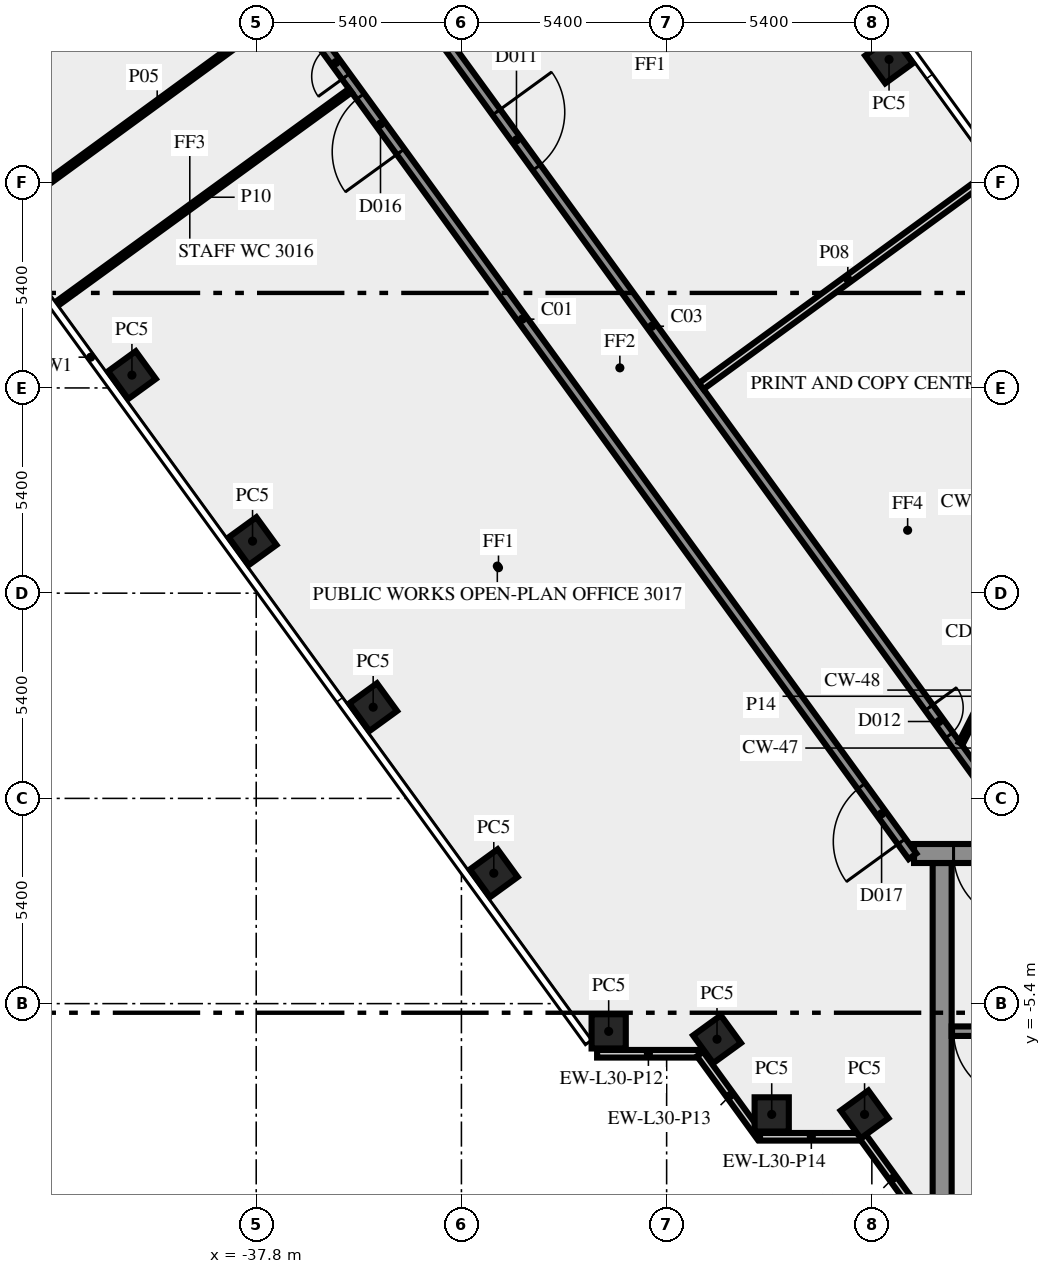
"""IFC4 building model, lengths in metres.
Left out: names, types, materials, properties, quantities, classifications, styles, units other than length and angle.
Written with IfcOpenShell. Run it as: python <this file> out.ifc"""

import sys

from ifc_helpers import new_model, si_unit, direction, frame, frame_2d, origin, origin_2d, place, context, subcontext, project, spatial, rectangle, extrude, element, fill, save


model = new_model("IFC4")
c1 = context("Model", 3, precision=1e-05, world=origin(), true_north=direction((0.0, 1.0)))
c2 = subcontext(c1, "Body", "Model", "MODEL_VIEW")
j1 = project(units=[si_unit("LENGTHUNIT", "METRE"), si_unit("PLANEANGLEUNIT", "RADIAN")], contexts=[c1])
p1 = place(None, origin())
s1 = spatial("IfcSite", under=j1, at=p1, CompositionType="ELEMENT")
p2 = place(p1, origin())
s2 = spatial("IfcBuilding", under=s1, at=p2, CompositionType="ELEMENT")
p3 = place(p2, frame((0.0, 0.0, 129.0)))
s3 = spatial("IfcBuildingStorey", under=s2, at=p3, CompositionType="ELEMENT", Elevation=129.0)
for number, where, z_axis, x_axis in (
    (1, (-21.147, 19.444, 0.0), (0.0, 0.0, 1.0), (-0.588, 0.809, 0.0)),
    (2, (-41.07, 11.137, 0.0), (0.0, 0.0, 1.0), (0.588, -0.809, 0.0)),
    (3, (-37.896, 6.769, 0.0), (0.0, 0.0, 1.0), (0.588, -0.809, 0.0)),
    (4, (-34.722, 2.4, 0.0), (0.0, 0.0, 1.0), (0.588, -0.809, 0.0)),
    (5, (-31.548, -1.969, 0.0), (0.0, 0.0, 1.0), (0.588, -0.809, 0.0)),
    (6, (-28.525, -6.13, 0.0), (0.0, 0.0, 1.0), (1.0, 0.0, 0.0)),
    (7, (-25.674, -6.337, 0.0), (0.0, 0.0, 1.0), (0.588, -0.809, 0.0)),
    (8, (-24.235, -8.315, 0.0), (0.0, 0.0, 1.0), (1.0, 0.0, 0.0)),
    (9, (-21.792, -8.315, 0.0), (0.0, 0.0, 1.0), (0.588, -0.809, 0.0)),
):
    element("IfcColumn", number, at=place(p3, frame(where, z_axis=z_axis, x_axis=x_axis)), inside=s3, PredefinedType="COLUMN", context=c2, shape_type="SweptSolid", body=[
        extrude(rectangle(XDim=0.9, YDim=0.9, at=origin_2d()), origin(), (0.0, 0.0, 1.0), 3.4),
    ])
p4 = place(p3, frame((-28.83, -6.719, 0.0), z_axis=(0.0, 0.0, 1.0), x_axis=(1.0, 0.0, 0.0)))
e10 = element("IfcWall", 10, at=p4, inside=s3, PredefinedType="SOLIDWALL", context=c2, shape_type="SweptSolid", body=[
    extrude(rectangle(XDim=2.7, YDim=0.2, at=frame_2d((1.35, 0.0))), origin(), (0.0, 0.0, 1.0), 3.4),
])
p5 = place(p3, frame((-26.12, -6.724, 0.0), z_axis=(0.0, 0.0, 1.0), x_axis=(0.587720002413, -0.809064397168, 0.0)))
e11 = element("IfcWall", 11, at=p5, inside=s3, PredefinedType="SOLIDWALL", context=c2, shape_type="SweptSolid", body=[
    extrude(rectangle(XDim=2.7, YDim=0.2, at=frame_2d((1.35, 0.0))), origin(), (0.0, 0.0, 1.0), 3.4),
])
p6 = place(p3, frame((-24.543, -8.904, 0.0), z_axis=(0.0, 0.0, 1.0), x_axis=(1.0, 0.0, 0.0)))
e12 = element("IfcWall", 12, at=p6, inside=s3, PredefinedType="SOLIDWALL", context=c2, shape_type="SweptSolid", body=[
    extrude(rectangle(XDim=2.7, YDim=0.2, at=frame_2d((1.35, 0.0))), origin(), (0.0, 0.0, 1.0), 3.4),
])
p7 = place(p3, frame((-21.833, -8.909, 0.0), z_axis=(0.0, 0.0, 1.0), x_axis=(0.587766567315, -0.809030569476, 0.0)))
e13 = element("IfcWall", 13, at=p7, inside=s3, PredefinedType="SOLIDWALL", context=c2, shape_type="SweptSolid", body=[
    extrude(rectangle(XDim=2.688, YDim=0.2, at=frame_2d((1.344, 0.0))), origin(), (0.0, 0.0, 1.0), 3.4),
])
p8 = place(p3, frame((-19.75, -10.5, 0.0), z_axis=(0.0, 0.0, 1.0), x_axis=(0.0, 1.0, 0.0)))
e14 = element("IfcWall", 14, at=p8, inside=s3, PredefinedType="SHEAR", context=c2, shape_type="SweptSolid", body=[
    extrude(rectangle(XDim=8.8, YDim=0.5, at=frame_2d((4.4, 0.0))), origin(), (0.0, 0.0, 1.0), 3.4),
])
p9 = place(p3, frame((-11.45, -6.125, 0.0), z_axis=(0.0, 0.0, 1.0), x_axis=(-1.0, 0.0, 0.0)))
e15 = element("IfcWall", 15, at=p9, inside=s3, PredefinedType="SHEAR", context=c2, shape_type="SweptSolid", body=[
    extrude(rectangle(XDim=8.05, YDim=0.25, at=frame_2d((4.025, 0.0))), origin(), (0.0, 0.0, 1.0), 3.4),
])
p10 = place(p9, frame((6.2, 0.0, 0.0)))
e16 = element("IfcOpeningElement", 16, at=p10, cuts=e15, PredefinedType="OPENING", context=c2, shape_type="SweptSolid", body=[
    extrude(rectangle(XDim=1.8, YDim=2.1, at=frame_2d((0.9, 1.05))), frame((0.0, 0.135, 0.0), z_axis=(0.0, -1.0, 0.0), x_axis=(1.0, 0.0, 0.0)), (0.0, 0.0, 1.0), 0.27),
])
p11 = place(p3, frame((20.49, -1.45, 0.0), z_axis=(0.0, 0.0, 1.0), x_axis=(-1.0, 0.0, 0.0)))
e17 = element("IfcWall", 17, at=p11, inside=s3, PredefinedType="SHEAR", context=c2, shape_type="SweptSolid", body=[
    extrude(rectangle(XDim=40.98, YDim=0.5, at=frame_2d((20.49, 0.0))), origin(), (0.0, 0.0, 1.0), 3.4),
])
p12 = place(p11, frame((38.14, 0.0, 0.0)))
e18 = element("IfcOpeningElement", 18, at=p12, cuts=e17, PredefinedType="OPENING", context=c2, shape_type="SweptSolid", body=[
    extrude(rectangle(XDim=1.8, YDim=2.1, at=frame_2d((0.9, 1.05))), frame((0.0, 0.26, 0.0), z_axis=(0.0, -1.0, 0.0), x_axis=(1.0, 0.0, 0.0)), (0.0, 0.0, 1.0), 0.52),
])
p13 = place(p11, frame((35.89, 0.0, 0.0)))
e19 = element("IfcOpeningElement", 19, at=p13, cuts=e17, PredefinedType="OPENING", context=c2, shape_type="SweptSolid", body=[
    extrude(rectangle(XDim=0.9, YDim=2.1, at=frame_2d((0.45, 1.05))), frame((0.0, 0.26, 0.0), z_axis=(0.0, -1.0, 0.0), x_axis=(1.0, 0.0, 0.0)), (0.0, 0.0, 1.0), 0.52),
])
p14 = place(p11, frame((32.94, 0.0, 0.0)))
e20 = element("IfcOpeningElement", 20, at=p14, cuts=e17, PredefinedType="OPENING", context=c2, shape_type="SweptSolid", body=[
    extrude(rectangle(XDim=0.9, YDim=2.1, at=frame_2d((0.45, 1.05))), frame((0.0, 0.26, 0.0), z_axis=(0.0, -1.0, 0.0), x_axis=(1.0, 0.0, 0.0)), (0.0, 0.0, 1.0), 0.52),
])
p15 = place(p11, frame((19.59, 0.0, 0.0)))
e21 = element("IfcOpeningElement", 21, at=p15, cuts=e17, PredefinedType="OPENING", context=c2, shape_type="SweptSolid", body=[
    extrude(rectangle(XDim=2.0, YDim=2.1, at=frame_2d((1.0, 1.05))), frame((0.0, 0.26, 0.0), z_axis=(0.0, -1.0, 0.0), x_axis=(1.0, 0.0, 0.0)), (0.0, 0.0, 1.0), 0.52),
])
p16 = place(p11, frame((7.14, 0.0, 0.0)))
e22 = element("IfcOpeningElement", 22, at=p16, cuts=e17, PredefinedType="OPENING", context=c2, shape_type="SweptSolid", body=[
    extrude(rectangle(XDim=0.9, YDim=2.1, at=frame_2d((0.45, 1.05))), frame((0.0, 0.26, 0.0), z_axis=(0.0, -1.0, 0.0), x_axis=(1.0, 0.0, 0.0)), (0.0, 0.0, 1.0), 0.52),
])
p17 = place(p11, frame((5.028, 0.0, 0.0)))
e23 = element("IfcOpeningElement", 23, at=p17, cuts=e17, PredefinedType="OPENING", context=c2, shape_type="SweptSolid", body=[
    extrude(rectangle(XDim=0.8, YDim=2.1, at=frame_2d((0.4, 1.05))), frame((0.0, 0.26, 0.0), z_axis=(0.0, -1.0, 0.0), x_axis=(1.0, 0.0, 0.0)), (0.0, 0.0, 1.0), 0.52),
])
p18 = place(p11, frame((3.452, 0.0, 0.0)))
e24 = element("IfcOpeningElement", 24, at=p18, cuts=e17, PredefinedType="OPENING", context=c2, shape_type="SweptSolid", body=[
    extrude(rectangle(XDim=0.8, YDim=2.1, at=frame_2d((0.4, 1.05))), frame((0.0, 0.26, 0.0), z_axis=(0.0, -1.0, 0.0), x_axis=(1.0, 0.0, 0.0)), (0.0, 0.0, 1.0), 0.52),
])
p19 = place(p11, frame((1.04, 0.0, 0.0)))
e25 = element("IfcOpeningElement", 25, at=p19, cuts=e17, PredefinedType="OPENING", context=c2, shape_type="SweptSolid", body=[
    extrude(rectangle(XDim=1.8, YDim=2.1, at=frame_2d((0.9, 1.05))), frame((0.0, 0.26, 0.0), z_axis=(0.0, -1.0, 0.0), x_axis=(1.0, 0.0, 0.0)), (0.0, 0.0, 1.0), 0.52),
])
p20 = place(p3, frame((-20.531, -1.523, 0.0), z_axis=(0.0, 0.0, 1.0), x_axis=(-0.587784522481, 0.809017524614, 0.0)))
e26 = element("IfcWall", 26, at=p20, inside=s3, PredefinedType="SOLIDWALL", context=c2, shape_type="SweptSolid", body=[
    extrude(rectangle(XDim=49.912, YDim=0.25, at=frame_2d((24.956, 0.0))), origin(), (0.0, 0.0, 1.0), 3.4),
])
p21 = place(p20, frame((34.816, 0.0, 0.0)))
e27 = element("IfcOpeningElement", 27, at=p21, cuts=e26, PredefinedType="OPENING", context=c2, shape_type="SweptSolid", body=[
    extrude(rectangle(XDim=0.9, YDim=2.1, at=frame_2d((0.45, 1.05))), frame((0.0, 0.135, 0.0), z_axis=(0.0, -1.0, 0.0), x_axis=(1.0, 0.0, 0.0)), (0.0, 0.0, 1.0), 0.27),
])
p22 = place(p20, frame((33.215, 0.0, 0.0)))
e28 = element("IfcOpeningElement", 28, at=p22, cuts=e26, PredefinedType="OPENING", context=c2, shape_type="SweptSolid", body=[
    extrude(rectangle(XDim=0.9, YDim=2.1, at=frame_2d((0.45, 1.05))), frame((0.0, 0.135, 0.0), z_axis=(0.0, -1.0, 0.0), x_axis=(1.0, 0.0, 0.0)), (0.0, 0.0, 1.0), 0.27),
])
p23 = place(p20, frame((22.916, 0.0, 0.0)))
e29 = element("IfcOpeningElement", 29, at=p23, cuts=e26, PredefinedType="OPENING", context=c2, shape_type="SweptSolid", body=[
    extrude(rectangle(XDim=1.8, YDim=2.1, at=frame_2d((0.9, 1.05))), frame((0.0, 0.135, 0.0), z_axis=(0.0, -1.0, 0.0), x_axis=(1.0, 0.0, 0.0)), (0.0, 0.0, 1.0), 0.27),
])
p24 = place(p20, frame((0.483, 0.0, 0.0)))
e30 = element("IfcOpeningElement", 30, at=p24, cuts=e26, PredefinedType="OPENING", context=c2, shape_type="SweptSolid", body=[
    extrude(rectangle(XDim=1.8, YDim=2.1, at=frame_2d((0.9, 1.05))), frame((0.0, 0.135, 0.0), z_axis=(0.0, -1.0, 0.0), x_axis=(1.0, 0.0, 0.0)), (0.0, 0.0, 1.0), 0.27),
])
p25 = place(p20, frame((25.365, 0.0, 0.0)))
e31 = element("IfcOpeningElement", 31, at=p25, cuts=e26, PredefinedType="OPENING", context=c2, shape_type="SweptSolid", body=[
    extrude(rectangle(XDim=0.9, YDim=2.1, at=frame_2d((0.45, 1.05))), frame((0.0, 0.135, 0.0), z_axis=(0.0, -1.0, 0.0), x_axis=(1.0, 0.0, 0.0)), (0.0, 0.0, 1.0), 0.27),
])
p26 = place(p3, frame((-37.232, 25.972, 0.0), z_axis=(0.0, 0.0, 1.0), x_axis=(0.587786323093, -0.809016216391, 0.0)))
e32 = element("IfcWall", 32, at=p26, inside=s3, PredefinedType="SOLIDWALL", context=c2, shape_type="SweptSolid", body=[
    extrude(rectangle(XDim=33.493, YDim=0.25, at=frame_2d((16.747, 0.0))), origin(), (0.0, 0.0, 1.0), 3.4),
])
p27 = place(p26, frame((9.785, 0.0, 0.0)))
e33 = element("IfcOpeningElement", 33, at=p27, cuts=e32, PredefinedType="OPENING", context=c2, shape_type="SweptSolid", body=[
    extrude(rectangle(XDim=1.8, YDim=2.1, at=frame_2d((0.9, 1.05))), frame((0.0, 0.135, 0.0), z_axis=(0.0, -1.0, 0.0), x_axis=(1.0, 0.0, 0.0)), (0.0, 0.0, 1.0), 0.27),
])
p28 = place(p26, frame((29.152, 0.0, 0.0)))
e34 = element("IfcOpeningElement", 34, at=p28, cuts=e32, PredefinedType="OPENING", context=c2, shape_type="SweptSolid", body=[
    extrude(rectangle(XDim=0.9, YDim=2.1, at=frame_2d((0.45, 1.05))), frame((0.0, 0.135, 0.0), z_axis=(0.0, -1.0, 0.0), x_axis=(1.0, 0.0, 0.0)), (0.0, 0.0, 1.0), 0.27),
])
p29 = place(p26, frame((1.335, 0.0, 0.0)))
e35 = element("IfcOpeningElement", 35, at=p29, cuts=e32, PredefinedType="OPENING", context=c2, shape_type="SweptSolid", body=[
    extrude(rectangle(XDim=0.9, YDim=2.1, at=frame_2d((0.45, 1.05))), frame((0.0, 0.135, 0.0), z_axis=(0.0, -1.0, 0.0), x_axis=(1.0, 0.0, 0.0)), (0.0, 0.0, 1.0), 0.27),
])
p30 = place(p3, frame((-43.876, 15.773, 0.0), z_axis=(0.0, 0.0, 1.0), x_axis=(0.807597163234, 0.589734535139, 0.0)))
e36 = element("IfcWall", 36, at=p30, inside=s3, PredefinedType="PARTITIONING", context=c2, shape_type="SweptSolid", body=[
    extrude(rectangle(XDim=8.595, YDim=0.12, at=frame_2d((4.298, 0.0))), origin(), (0.0, 0.0, 1.0), 3.4),
])
p31 = place(p3, frame((-26.089, 10.848, 0.0), z_axis=(0.0, 0.0, 1.0), x_axis=(0.807661302092, 0.589646691759, 0.0)))
e37 = element("IfcWall", 37, at=p31, inside=s3, PredefinedType="SOLIDWALL", context=c2, shape_type="SweptSolid", body=[
    extrude(rectangle(XDim=9.55, YDim=0.2, at=frame_2d((4.775, 0.0))), origin(), (0.0, 0.0, 1.0), 2.5),
])
p32 = place(p3, frame((-35.324, 18.625, 0.0), z_axis=(0.0, 0.0, 1.0), x_axis=(-0.808998008689, -0.58781138296, 0.0)))
e38 = element("IfcWall", 38, at=p32, inside=s3, PredefinedType="PARTITIONING", context=c2, shape_type="SweptSolid", body=[
    extrude(rectangle(XDim=9.55, YDim=0.12, at=frame_2d((4.775, 0.0))), origin(), (0.0, 0.0, 1.0), 2.5),
])
p33 = place(p3, frame((-19.261, 1.45, 0.0), z_axis=(0.0, 0.0, 1.0), x_axis=(0.453950796792, 0.891026752736, 0.0)))
e39 = element("IfcWall", 39, at=p33, inside=s3, PredefinedType="PARTITIONING", context=c2, shape_type="SweptSolid", body=[
    extrude(rectangle(XDim=2.778, YDim=0.12, at=frame_2d((1.389, 0.0))), origin(), (0.0, 0.0, 1.0), 3.4),
])
p34 = place(p10, origin())
e40 = element("IfcDoor", 40, at=p34, inside=s3, OperationType="DOUBLE_DOOR_SINGLE_SWING", PredefinedType="DOOR", context=c2, shape_type="SweptSolid", body=[
    extrude(rectangle(XDim=1.8, YDim=2.1, at=frame_2d((0.9, 1.05))), frame((0.0, 0.025, 0.0), z_axis=(0.0, -1.0, 0.0), x_axis=(1.0, 0.0, 0.0)), (0.0, 0.0, 1.0), 0.05),
])
fill(e16, e40)
p35 = place(p12, origin())
e41 = element("IfcDoor", 41, at=p35, inside=s3, OperationType="DOUBLE_DOOR_SINGLE_SWING", PredefinedType="DOOR", context=c2, shape_type="SweptSolid", body=[
    extrude(rectangle(XDim=1.8, YDim=2.1, at=frame_2d((0.9, 1.05))), frame((0.0, 0.025, 0.0), z_axis=(0.0, -1.0, 0.0), x_axis=(1.0, 0.0, 0.0)), (0.0, 0.0, 1.0), 0.05),
])
fill(e18, e41)
p36 = place(p27, origin())
e42 = element("IfcDoor", 42, at=p36, inside=s3, OperationType="DOUBLE_DOOR_SINGLE_SWING", PredefinedType="DOOR", context=c2, shape_type="SweptSolid", body=[
    extrude(rectangle(XDim=1.8, YDim=2.1, at=frame_2d((0.9, 1.05))), frame((0.0, 0.025, 0.0), z_axis=(0.0, -1.0, 0.0), x_axis=(1.0, 0.0, 0.0)), (0.0, 0.0, 1.0), 0.05),
])
fill(e33, e42)
p37 = place(p23, origin())
e43 = element("IfcDoor", 43, at=p37, inside=s3, OperationType="DOUBLE_DOOR_SINGLE_SWING", PredefinedType="DOOR", context=c2, shape_type="SweptSolid", body=[
    extrude(rectangle(XDim=1.8, YDim=2.1, at=frame_2d((0.9, 1.05))), frame((0.0, 0.025, 0.0), z_axis=(0.0, -1.0, 0.0), x_axis=(1.0, 0.0, 0.0)), (0.0, 0.0, 1.0), 0.05),
])
fill(e29, e43)
p38 = place(p24, origin())
e44 = element("IfcDoor", 44, at=p38, inside=s3, OperationType="DOUBLE_DOOR_SINGLE_SWING", PredefinedType="DOOR", context=c2, shape_type="SweptSolid", body=[
    extrude(rectangle(XDim=1.8, YDim=2.1, at=frame_2d((0.9, 1.05))), frame((0.0, 0.025, 0.0), z_axis=(0.0, -1.0, 0.0), x_axis=(1.0, 0.0, 0.0)), (0.0, 0.0, 1.0), 0.05),
])
fill(e30, e44)
p39 = place(p28, origin())
e45 = element("IfcDoor", 45, at=p39, inside=s3, OperationType="SINGLE_SWING_RIGHT", PredefinedType="DOOR", context=c2, shape_type="SweptSolid", body=[
    extrude(rectangle(XDim=0.9, YDim=2.1, at=frame_2d((0.45, 1.05))), frame((0.0, 0.025, 0.0), z_axis=(0.0, -1.0, 0.0), x_axis=(1.0, 0.0, 0.0)), (0.0, 0.0, 1.0), 0.05),
])
fill(e34, e45)
p40 = place(p25, origin())
e46 = element("IfcDoor", 46, at=p40, inside=s3, OperationType="SINGLE_SWING_LEFT", PredefinedType="DOOR", context=c2, shape_type="SweptSolid", body=[
    extrude(rectangle(XDim=0.9, YDim=2.1, at=frame_2d((0.45, 1.05))), frame((0.0, 0.025, 0.0), z_axis=(0.0, -1.0, 0.0), x_axis=(1.0, 0.0, 0.0)), (0.0, 0.0, 1.0), 0.05),
])
fill(e31, e46)
save(model, sys.argv[1])
